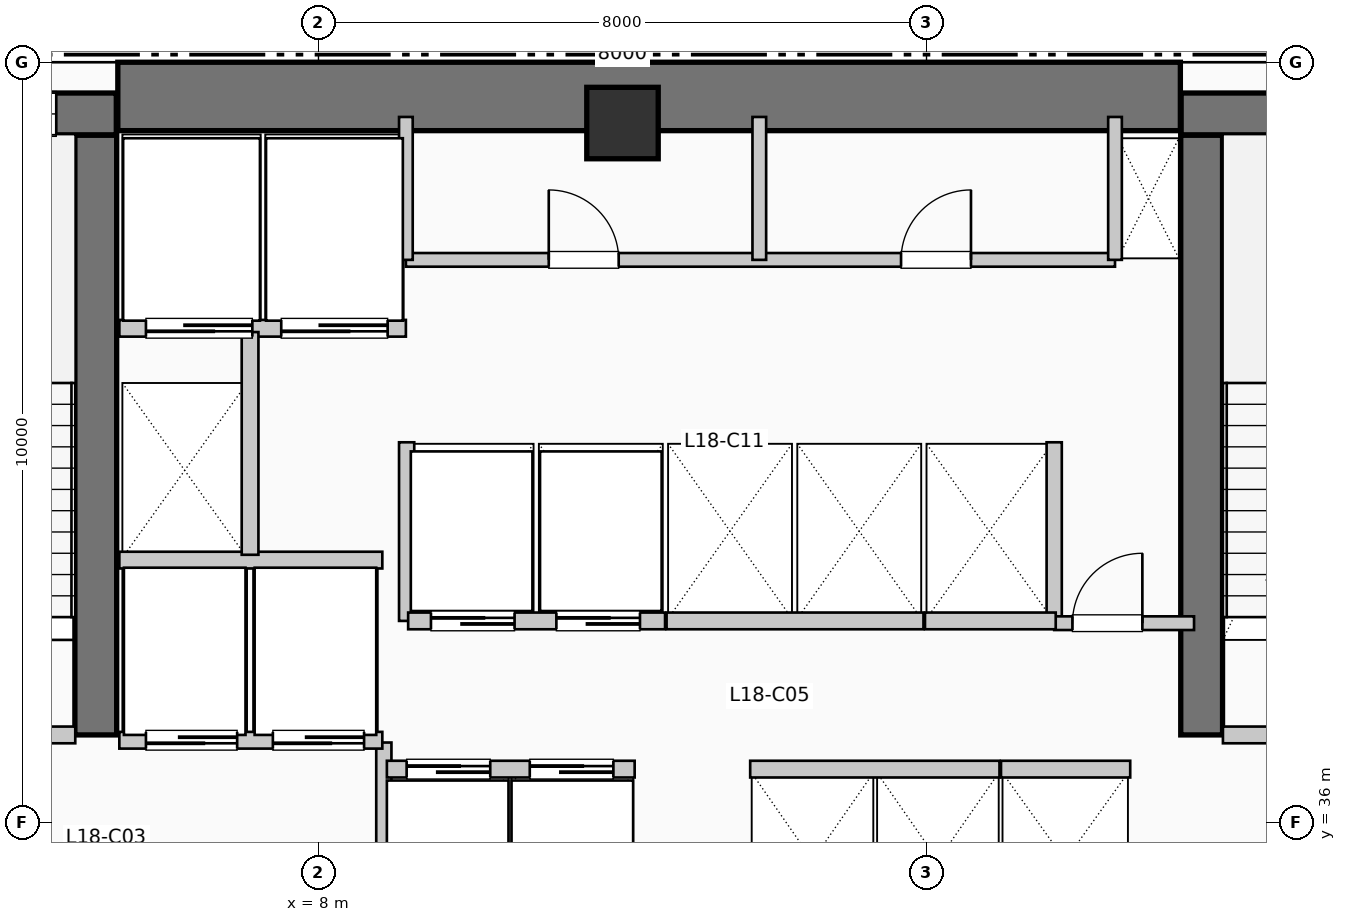
"""IFC4 building model, lengths in metres.
Left out: names, types, materials, properties, quantities, classifications, styles, units other than length and angle.
Written with IfcOpenShell. Run it as: python <this file> out.ifc"""

import sys

from ifc_helpers import new_model, si_unit, direction, frame, frame_2d, origin, origin_2d, place, context, subcontext, project, spatial, rectangle, extrude, element, fill, save


model = new_model("IFC4")
c1 = context("Model", 3, precision=1e-05, world=origin(), true_north=direction((0.0, 1.0)))
c2 = subcontext(c1, "Body", "Model", "MODEL_VIEW")
j1 = project(units=[si_unit("LENGTHUNIT", "METRE"), si_unit("PLANEANGLEUNIT", "RADIAN")], contexts=[c1])
p1 = place(None, origin())
s1 = spatial("IfcSite", under=j1, at=p1, CompositionType="ELEMENT")
p2 = place(p1, origin())
s2 = spatial("IfcBuilding", under=s1, at=p2, CompositionType="ELEMENT")
p3 = place(p2, frame((0.0, 0.0, 77.88)))
s3 = spatial("IfcBuildingStorey", under=s2, at=p3, CompositionType="ELEMENT", Elevation=77.88)
p4 = place(p3, frame((5.36, 45.55, 0.0), z_axis=(0.0, 0.0, 1.0), x_axis=(1.0, 0.0, 0.0)))
e1 = element("IfcWall", 1, at=p4, inside=s3, PredefinedType="SHEAR", context=c2, shape_type="SweptSolid", body=[
    extrude(rectangle(XDim=13.98, YDim=0.9, at=frame_2d((6.99, 0.0))), origin(), (0.0, 0.0, 1.0), 3.96),
])
p5 = place(p3, frame((5.07, 37.15, 0.0), z_axis=(0.0, 0.0, 1.0), x_axis=(0.0, 1.0, 0.0)))
e2 = element("IfcWall", 2, at=p5, inside=s3, PredefinedType="SHEAR", context=c2, shape_type="SweptSolid", body=[
    extrude(rectangle(XDim=7.89, YDim=0.55, at=frame_2d((3.945, 0.0))), origin(), (0.0, 0.0, 1.0), 3.96),
])
p6 = place(p3, frame((1.1, 45.32, 0.0), z_axis=(0.0, 0.0, 1.0), x_axis=(1.0, 0.0, 0.0)))
e3 = element("IfcWall", 3, at=p6, inside=s3, PredefinedType="SHEAR", context=c2, shape_type="SweptSolid", body=[
    extrude(rectangle(XDim=4.24, YDim=0.55, at=frame_2d((2.12, 0.0))), origin(), (0.0, 0.0, 1.0), 3.96),
])
p7 = place(p6, frame((2.05, 0.0, 1.05)))
e4 = element("IfcOpeningElement", 4, at=p7, cuts=e3, PredefinedType="OPENING", context=c2, shape_type="SweptSolid", body=[
    extrude(rectangle(XDim=1.4, YDim=1.8, at=frame_2d((0.7, 0.9))), frame((0.0, 0.285, 0.0), z_axis=(0.0, -1.0, 0.0), x_axis=(1.0, 0.0, 0.0)), (0.0, 0.0, 1.0), 0.57),
])
p8 = place(p3, frame((19.62, 37.15, 0.0), z_axis=(0.0, 0.0, 1.0), x_axis=(0.0, 1.0, 0.0)))
e5 = element("IfcWall", 5, at=p8, inside=s3, PredefinedType="SHEAR", context=c2, shape_type="SweptSolid", body=[
    extrude(rectangle(XDim=7.89, YDim=0.55, at=frame_2d((3.945, 0.0))), origin(), (0.0, 0.0, 1.0), 3.96),
])
p9 = place(p3, frame((19.35, 45.32, 0.0), z_axis=(0.0, 0.0, 1.0), x_axis=(1.0, 0.0, 0.0)))
e6 = element("IfcWall", 6, at=p9, inside=s3, PredefinedType="SHEAR", context=c2, shape_type="SweptSolid", body=[
    extrude(rectangle(XDim=3.69, YDim=0.55, at=frame_2d((1.845, 0.0))), origin(), (0.0, 0.0, 1.0), 3.96),
])
p10 = place(p9, frame((1.15, 0.0, 1.05)))
e7 = element("IfcOpeningElement", 7, at=p10, cuts=e6, PredefinedType="OPENING", context=c2, shape_type="SweptSolid", body=[
    extrude(rectangle(XDim=1.4, YDim=1.8, at=frame_2d((0.7, 0.9))), frame((0.0, 0.285, 0.0), z_axis=(0.0, -1.0, 0.0), x_axis=(1.0, 0.0, 0.0)), (0.0, 0.0, 1.0), 0.57),
])
p11 = place(p3, frame((12.0, 45.2, 0.0), z_axis=(0.0, 0.0, 1.0), x_axis=(1.0, 0.0, 0.0)))
e8 = element("IfcColumn", 8, at=p11, inside=s3, PredefinedType="COLUMN", context=c2, shape_type="SweptSolid", body=[
    extrude(rectangle(XDim=0.94, YDim=0.94, at=origin_2d()), origin(), (0.0, 0.0, 1.0), 3.96),
])
p12 = place(p3, frame((1.65, 37.15, 0.0), z_axis=(0.0, 0.0, 1.0), x_axis=(1.0, 0.0, 0.0)))
e9 = element("IfcWall", 9, at=p12, inside=s3, PredefinedType="PARTITIONING", context=c2, shape_type="SweptSolid", body=[
    extrude(rectangle(XDim=3.15, YDim=0.22, at=frame_2d((1.575, 0.0))), origin(), (0.0, 0.0, 1.0), 3.71),
])
p13 = place(p12, frame((2.05, 0.0, 0.0), z_axis=(0.0, 0.0, 1.0), x_axis=(-1.0, 0.0, 0.0)))
e10 = element("IfcOpeningElement", 10, at=p13, cuts=e9, PredefinedType="OPENING", context=c2, shape_type="SweptSolid", body=[
    extrude(rectangle(XDim=1.05, YDim=2.15, at=frame_2d((0.525, 1.075))), frame((0.0, 0.12, 0.0), z_axis=(0.0, -1.0, 0.0), x_axis=(1.0, 0.0, 0.0)), (0.0, 0.0, 1.0), 0.24),
])
p14 = place(p3, frame((8.86, 34.55, 0.0), z_axis=(0.0, 0.0, 1.0), x_axis=(0.0, 1.0, 0.0)))
e11 = element("IfcWall", 11, at=p14, inside=s3, PredefinedType="PARTITIONING", context=c2, shape_type="SweptSolid", body=[
    extrude(rectangle(XDim=2.5, YDim=0.2, at=frame_2d((1.25, 0.0))), origin(), (0.0, 0.0, 1.0), 3.71),
])
p15 = place(p3, frame((19.9, 37.15, 0.0), z_axis=(0.0, 0.0, 1.0), x_axis=(1.0, 0.0, 0.0)))
e12 = element("IfcWall", 12, at=p15, inside=s3, PredefinedType="PARTITIONING", context=c2, shape_type="SweptSolid", body=[
    extrude(rectangle(XDim=3.15, YDim=0.22, at=frame_2d((1.575, 0.0))), origin(), (0.0, 0.0, 1.0), 3.71),
])
p16 = place(p15, frame((2.05, 0.0, 0.0), z_axis=(0.0, 0.0, 1.0), x_axis=(-1.0, 0.0, 0.0)))
e13 = element("IfcOpeningElement", 13, at=p16, cuts=e12, PredefinedType="OPENING", context=c2, shape_type="SweptSolid", body=[
    extrude(rectangle(XDim=1.05, YDim=2.15, at=frame_2d((0.525, 1.075))), frame((0.0, 0.12, 0.0), z_axis=(0.0, -1.0, 0.0), x_axis=(1.0, 0.0, 0.0)), (0.0, 0.0, 1.0), 0.24),
])
p17 = place(p3, frame((5.38, 37.08, 0.0), z_axis=(0.0, 0.0, 1.0), x_axis=(1.0, 0.0, 0.0)))
e14 = element("IfcWall", 14, at=p17, inside=s3, PredefinedType="PARTITIONING", context=c2, shape_type="SweptSolid", body=[
    extrude(rectangle(XDim=3.46, YDim=0.22, at=frame_2d((1.73, 0.0))), origin(), (0.0, 0.0, 1.0), 3.71),
])
p18 = place(p17, frame((1.55, 0.0, 0.0), z_axis=(0.0, 0.0, 1.0), x_axis=(-1.0, 0.0, 0.0)))
e15 = element("IfcOpeningElement", 15, at=p18, cuts=e14, PredefinedType="OPENING", context=c2, shape_type="SweptSolid", body=[
    extrude(rectangle(XDim=1.2, YDim=2.2, at=frame_2d((0.6, 1.1))), frame((0.0, 0.12, 0.0), z_axis=(0.0, -1.0, 0.0), x_axis=(1.0, 0.0, 0.0)), (0.0, 0.0, 1.0), 0.24),
])
p19 = place(p17, frame((3.22, 0.0, 0.0), z_axis=(0.0, 0.0, 1.0), x_axis=(-1.0, 0.0, 0.0)))
e16 = element("IfcOpeningElement", 16, at=p19, cuts=e14, PredefinedType="OPENING", context=c2, shape_type="SweptSolid", body=[
    extrude(rectangle(XDim=1.2, YDim=2.2, at=frame_2d((0.6, 1.1))), frame((0.0, 0.12, 0.0), z_axis=(0.0, -1.0, 0.0), x_axis=(1.0, 0.0, 0.0)), (0.0, 0.0, 1.0), 0.24),
])
p20 = place(p3, frame((5.38, 39.45, 0.0), z_axis=(0.0, 0.0, 1.0), x_axis=(1.0, 0.0, 0.0)))
e17 = element("IfcWall", 17, at=p20, inside=s3, PredefinedType="PARTITIONING", context=c2, shape_type="SweptSolid", body=[
    extrude(rectangle(XDim=3.46, YDim=0.22, at=frame_2d((1.73, 0.0))), origin(), (0.0, 0.0, 1.0), 3.71),
])
p21 = place(p3, frame((5.38, 42.5, 0.0), z_axis=(0.0, 0.0, 1.0), x_axis=(1.0, 0.0, 0.0)))
e18 = element("IfcWall", 18, at=p21, inside=s3, PredefinedType="PARTITIONING", context=c2, shape_type="SweptSolid", body=[
    extrude(rectangle(XDim=3.77, YDim=0.22, at=frame_2d((1.885, 0.0))), origin(), (0.0, 0.0, 1.0), 3.71),
])
p22 = place(p21, frame((1.75, 0.0, 0.0), z_axis=(0.0, 0.0, 1.0), x_axis=(-1.0, 0.0, 0.0)))
e19 = element("IfcOpeningElement", 19, at=p22, cuts=e18, PredefinedType="OPENING", context=c2, shape_type="SweptSolid", body=[
    extrude(rectangle(XDim=1.4, YDim=2.2, at=frame_2d((0.7, 1.1))), frame((0.0, 0.12, 0.0), z_axis=(0.0, -1.0, 0.0), x_axis=(1.0, 0.0, 0.0)), (0.0, 0.0, 1.0), 0.24),
])
p23 = place(p21, frame((3.53, 0.0, 0.0), z_axis=(0.0, 0.0, 1.0), x_axis=(-1.0, 0.0, 0.0)))
e20 = element("IfcOpeningElement", 20, at=p23, cuts=e18, PredefinedType="OPENING", context=c2, shape_type="SweptSolid", body=[
    extrude(rectangle(XDim=1.4, YDim=2.2, at=frame_2d((0.7, 1.1))), frame((0.0, 0.12, 0.0), z_axis=(0.0, -1.0, 0.0), x_axis=(1.0, 0.0, 0.0)), (0.0, 0.0, 1.0), 0.24),
])
p24 = place(p3, frame((7.1, 39.52, 0.0), z_axis=(0.0, 0.0, 1.0), x_axis=(0.0, 1.0, 0.0)))
e21 = element("IfcWall", 21, at=p24, inside=s3, PredefinedType="PARTITIONING", context=c2, shape_type="SweptSolid", body=[
    extrude(rectangle(XDim=2.93, YDim=0.22, at=frame_2d((1.465, 0.0))), origin(), (0.0, 0.0, 1.0), 3.71),
])
for number, where, z_axis, x_axis in (
    (22, (9.16, 38.65, 0.0), (0.0, 0.0, 1.0), (0.0, 1.0, 0.0)),
    (23, (17.68, 38.65, 0.0), (0.0, 0.0, 1.0), (0.0, 1.0, 0.0)),
):
    element("IfcWall", number, at=place(p3, frame(where, z_axis=z_axis, x_axis=x_axis)), inside=s3, PredefinedType="PARTITIONING", context=c2, shape_type="SweptSolid", body=[
        extrude(rectangle(XDim=2.35, YDim=0.2, at=frame_2d((1.175, 0.0))), origin(), (0.0, 0.0, 1.0), 3.71),
    ])
p25 = place(p3, frame((17.68, 38.62, 0.0), z_axis=(0.0, 0.0, 1.0), x_axis=(1.0, 0.0, 0.0)))
e24 = element("IfcWall", 24, at=p25, inside=s3, PredefinedType="PARTITIONING", context=c2, shape_type="SweptSolid", body=[
    extrude(rectangle(XDim=1.84, YDim=0.18, at=frame_2d((0.92, 0.0))), origin(), (0.0, 0.0, 1.0), 3.71),
])
p26 = place(p25, frame((0.24, 0.0, 0.0)))
e25 = element("IfcOpeningElement", 25, at=p26, cuts=e24, PredefinedType="OPENING", context=c2, shape_type="SweptSolid", body=[
    extrude(rectangle(XDim=0.92, YDim=2.1, at=frame_2d((0.46, 1.05))), frame((0.0, 0.1, 0.0), z_axis=(0.0, -1.0, 0.0), x_axis=(1.0, 0.0, 0.0)), (0.0, 0.0, 1.0), 0.2),
])
p27 = place(p3, frame((8.9, 36.7, 0.0), z_axis=(0.0, 0.0, 1.0), x_axis=(1.0, 0.0, 0.0)))
e26 = element("IfcWall", 26, at=p27, inside=s3, PredefinedType="PARTITIONING", context=c2, shape_type="SweptSolid", body=[
    extrude(rectangle(XDim=3.26, YDim=0.22, at=frame_2d((1.63, 0.0))), origin(), (0.0, 0.0, 1.0), 3.71),
])
p28 = place(p27, frame((0.26, 0.0, 0.0)))
e27 = element("IfcOpeningElement", 27, at=p28, cuts=e26, PredefinedType="OPENING", context=c2, shape_type="SweptSolid", body=[
    extrude(rectangle(XDim=1.1, YDim=2.2, at=frame_2d((0.55, 1.1))), frame((0.0, 0.12, 0.0), z_axis=(0.0, -1.0, 0.0), x_axis=(1.0, 0.0, 0.0)), (0.0, 0.0, 1.0), 0.24),
])
p29 = place(p27, frame((1.88, 0.0, 0.0)))
e28 = element("IfcOpeningElement", 28, at=p29, cuts=e26, PredefinedType="OPENING", context=c2, shape_type="SweptSolid", body=[
    extrude(rectangle(XDim=1.1, YDim=2.2, at=frame_2d((0.55, 1.1))), frame((0.0, 0.12, 0.0), z_axis=(0.0, -1.0, 0.0), x_axis=(1.0, 0.0, 0.0)), (0.0, 0.0, 1.0), 0.24),
])
p30 = place(p3, frame((9.18, 38.65, 0.0), z_axis=(0.0, 0.0, 1.0), x_axis=(1.0, 0.0, 0.0)))
e29 = element("IfcWall", 29, at=p30, inside=s3, PredefinedType="PARTITIONING", context=c2, shape_type="SweptSolid", body=[
    extrude(rectangle(XDim=3.38, YDim=0.22, at=frame_2d((1.69, 0.0))), origin(), (0.0, 0.0, 1.0), 3.71),
])
p31 = place(p30, frame((0.3, 0.0, 0.0)))
e30 = element("IfcOpeningElement", 30, at=p31, cuts=e29, PredefinedType="OPENING", context=c2, shape_type="SweptSolid", body=[
    extrude(rectangle(XDim=1.1, YDim=2.2, at=frame_2d((0.55, 1.1))), frame((0.0, 0.12, 0.0), z_axis=(0.0, -1.0, 0.0), x_axis=(1.0, 0.0, 0.0)), (0.0, 0.0, 1.0), 0.24),
])
p32 = place(p30, frame((1.95, 0.0, 0.0)))
e31 = element("IfcOpeningElement", 31, at=p32, cuts=e29, PredefinedType="OPENING", context=c2, shape_type="SweptSolid", body=[
    extrude(rectangle(XDim=1.1, YDim=2.2, at=frame_2d((0.55, 1.1))), frame((0.0, 0.12, 0.0), z_axis=(0.0, -1.0, 0.0), x_axis=(1.0, 0.0, 0.0)), (0.0, 0.0, 1.0), 0.24),
])
p33 = place(p3, frame((13.68, 36.7, 0.0), z_axis=(0.0, 0.0, 1.0), x_axis=(1.0, 0.0, 0.0)))
e32 = element("IfcWall", 32, at=p33, inside=s3, PredefinedType="PARTITIONING", context=c2, shape_type="SweptSolid", body=[
    extrude(rectangle(XDim=3.28, YDim=0.22, at=frame_2d((1.64, 0.0))), origin(), (0.0, 0.0, 1.0), 3.71),
])
p34 = place(p3, frame((12.58, 38.65, 0.0), z_axis=(0.0, 0.0, 1.0), x_axis=(1.0, 0.0, 0.0)))
e33 = element("IfcWall", 33, at=p34, inside=s3, PredefinedType="PARTITIONING", context=c2, shape_type="SweptSolid", body=[
    extrude(rectangle(XDim=3.38, YDim=0.22, at=frame_2d((1.69, 0.0))), origin(), (0.0, 0.0, 1.0), 3.71),
])
p35 = place(p3, frame((16.98, 36.7, 0.0), z_axis=(0.0, 0.0, 1.0), x_axis=(1.0, 0.0, 0.0)))
e34 = element("IfcWall", 34, at=p35, inside=s3, PredefinedType="PARTITIONING", context=c2, shape_type="SweptSolid", body=[
    extrude(rectangle(XDim=1.7, YDim=0.22, at=frame_2d((0.85, 0.0))), origin(), (0.0, 0.0, 1.0), 3.71),
])
p36 = place(p3, frame((15.98, 38.65, 0.0), z_axis=(0.0, 0.0, 1.0), x_axis=(1.0, 0.0, 0.0)))
e35 = element("IfcWall", 35, at=p36, inside=s3, PredefinedType="PARTITIONING", context=c2, shape_type="SweptSolid", body=[
    extrude(rectangle(XDim=1.72, YDim=0.22, at=frame_2d((0.86, 0.0))), origin(), (0.0, 0.0, 1.0), 3.71),
])
p37 = place(p3, frame((9.15, 43.4, 0.0), z_axis=(0.0, 0.0, 1.0), x_axis=(1.0, 0.0, 0.0)))
e36 = element("IfcWall", 36, at=p37, inside=s3, PredefinedType="PLUMBINGWALL", context=c2, shape_type="SweptSolid", body=[
    extrude(rectangle(XDim=9.33, YDim=0.18, at=frame_2d((4.665, 0.0))), origin(), (0.0, 0.0, 1.0), 3.71),
])
p38 = place(p37, frame((1.88, 0.0, 0.0)))
e37 = element("IfcOpeningElement", 37, at=p38, cuts=e36, PredefinedType="OPENING", context=c2, shape_type="SweptSolid", body=[
    extrude(rectangle(XDim=0.92, YDim=2.1, at=frame_2d((0.46, 1.05))), frame((0.0, 0.1, 0.0), z_axis=(0.0, -1.0, 0.0), x_axis=(1.0, 0.0, 0.0)), (0.0, 0.0, 1.0), 0.2),
])
p39 = place(p37, frame((6.515, 0.0, 0.0)))
e38 = element("IfcOpeningElement", 38, at=p39, cuts=e36, PredefinedType="OPENING", context=c2, shape_type="SweptSolid", body=[
    extrude(rectangle(XDim=0.92, YDim=2.1, at=frame_2d((0.46, 1.05))), frame((0.0, 0.1, 0.0), z_axis=(0.0, -1.0, 0.0), x_axis=(1.0, 0.0, 0.0)), (0.0, 0.0, 1.0), 0.2),
])
for number, where, z_axis, x_axis in (
    (39, (9.15, 43.4, 0.0), (0.0, 0.0, 1.0), (0.0, 1.0, 0.0)),
    (40, (18.48, 43.4, 0.0), (0.0, 0.0, 1.0), (0.0, 1.0, 0.0)),
    (41, (13.8, 43.4, 0.0), (0.0, 0.0, 1.0), (0.0, 1.0, 0.0)),
):
    element("IfcWall", number, at=place(p3, frame(where, z_axis=z_axis, x_axis=x_axis)), inside=s3, PredefinedType="PLUMBINGWALL", context=c2, shape_type="SweptSolid", body=[
        extrude(rectangle(XDim=1.88, YDim=0.18, at=frame_2d((0.94, 0.0))), origin(), (0.0, 0.0, 1.0), 3.71),
    ])
p40 = place(p7, origin())
e42 = element("IfcWindow", 42, at=p40, inside=s3, PartitioningType="SINGLE_PANEL", PredefinedType="WINDOW", context=c2, shape_type="SweptSolid", body=[
    extrude(rectangle(XDim=1.4, YDim=1.8, at=frame_2d((0.7, 0.9))), frame((0.0, 0.03, 0.0), z_axis=(0.0, -1.0, 0.0), x_axis=(1.0, 0.0, 0.0)), (0.0, 0.0, 1.0), 0.06),
])
fill(e4, e42)
p41 = place(p18, origin())
e43 = element("IfcDoor", 43, at=p41, inside=s3, OperationType="SLIDING_TO_RIGHT", PredefinedType="DOOR", context=c2, shape_type="SweptSolid", body=[
    extrude(rectangle(XDim=1.2, YDim=2.2, at=frame_2d((0.6, 1.1))), frame((0.0, 0.025, 0.0), z_axis=(0.0, -1.0, 0.0), x_axis=(1.0, 0.0, 0.0)), (0.0, 0.0, 1.0), 0.05),
])
fill(e15, e43)
p42 = place(p19, origin())
e44 = element("IfcDoor", 44, at=p42, inside=s3, OperationType="SLIDING_TO_RIGHT", PredefinedType="DOOR", context=c2, shape_type="SweptSolid", body=[
    extrude(rectangle(XDim=1.2, YDim=2.2, at=frame_2d((0.6, 1.1))), frame((0.0, 0.025, 0.0), z_axis=(0.0, -1.0, 0.0), x_axis=(1.0, 0.0, 0.0)), (0.0, 0.0, 1.0), 0.05),
])
fill(e16, e44)
p43 = place(p22, origin())
e45 = element("IfcDoor", 45, at=p43, inside=s3, OperationType="SLIDING_TO_LEFT", PredefinedType="DOOR", context=c2, shape_type="SweptSolid", body=[
    extrude(rectangle(XDim=1.4, YDim=2.2, at=frame_2d((0.7, 1.1))), frame((0.0, 0.025, 0.0), z_axis=(0.0, -1.0, 0.0), x_axis=(1.0, 0.0, 0.0)), (0.0, 0.0, 1.0), 0.05),
])
fill(e19, e45)
p44 = place(p23, origin())
e46 = element("IfcDoor", 46, at=p44, inside=s3, OperationType="SLIDING_TO_LEFT", PredefinedType="DOOR", context=c2, shape_type="SweptSolid", body=[
    extrude(rectangle(XDim=1.4, YDim=2.2, at=frame_2d((0.7, 1.1))), frame((0.0, 0.025, 0.0), z_axis=(0.0, -1.0, 0.0), x_axis=(1.0, 0.0, 0.0)), (0.0, 0.0, 1.0), 0.05),
])
fill(e20, e46)
p45 = place(p26, origin())
e47 = element("IfcDoor", 47, at=p45, inside=s3, OperationType="SINGLE_SWING_RIGHT", PredefinedType="DOOR", context=c2, shape_type="SweptSolid", body=[
    extrude(rectangle(XDim=0.92, YDim=2.1, at=frame_2d((0.46, 1.05))), frame((0.0, 0.025, 0.0), z_axis=(0.0, -1.0, 0.0), x_axis=(1.0, 0.0, 0.0)), (0.0, 0.0, 1.0), 0.05),
])
fill(e25, e47)
p46 = place(p28, origin())
e48 = element("IfcDoor", 48, at=p46, inside=s3, OperationType="SLIDING_TO_LEFT", PredefinedType="DOOR", context=c2, shape_type="SweptSolid", body=[
    extrude(rectangle(XDim=1.1, YDim=2.2, at=frame_2d((0.55, 1.1))), frame((0.0, 0.025, 0.0), z_axis=(0.0, -1.0, 0.0), x_axis=(1.0, 0.0, 0.0)), (0.0, 0.0, 1.0), 0.05),
])
fill(e27, e48)
p47 = place(p29, origin())
e49 = element("IfcDoor", 49, at=p47, inside=s3, OperationType="SLIDING_TO_LEFT", PredefinedType="DOOR", context=c2, shape_type="SweptSolid", body=[
    extrude(rectangle(XDim=1.1, YDim=2.2, at=frame_2d((0.55, 1.1))), frame((0.0, 0.025, 0.0), z_axis=(0.0, -1.0, 0.0), x_axis=(1.0, 0.0, 0.0)), (0.0, 0.0, 1.0), 0.05),
])
fill(e28, e49)
p48 = place(p31, origin())
e50 = element("IfcDoor", 50, at=p48, inside=s3, OperationType="SLIDING_TO_LEFT", PredefinedType="DOOR", context=c2, shape_type="SweptSolid", body=[
    extrude(rectangle(XDim=1.1, YDim=2.2, at=frame_2d((0.55, 1.1))), frame((0.0, 0.025, 0.0), z_axis=(0.0, -1.0, 0.0), x_axis=(1.0, 0.0, 0.0)), (0.0, 0.0, 1.0), 0.05),
])
fill(e30, e50)
p49 = place(p32, origin())
e51 = element("IfcDoor", 51, at=p49, inside=s3, OperationType="SLIDING_TO_LEFT", PredefinedType="DOOR", context=c2, shape_type="SweptSolid", body=[
    extrude(rectangle(XDim=1.1, YDim=2.2, at=frame_2d((0.55, 1.1))), frame((0.0, 0.025, 0.0), z_axis=(0.0, -1.0, 0.0), x_axis=(1.0, 0.0, 0.0)), (0.0, 0.0, 1.0), 0.05),
])
fill(e31, e51)
p50 = place(p38, origin())
e52 = element("IfcDoor", 52, at=p50, inside=s3, OperationType="SINGLE_SWING_LEFT", PredefinedType="DOOR", context=c2, shape_type="SweptSolid", body=[
    extrude(rectangle(XDim=0.92, YDim=2.1, at=frame_2d((0.46, 1.05))), frame((0.0, 0.025, 0.0), z_axis=(0.0, -1.0, 0.0), x_axis=(1.0, 0.0, 0.0)), (0.0, 0.0, 1.0), 0.05),
])
fill(e37, e52)
p51 = place(p39, origin())
e53 = element("IfcDoor", 53, at=p51, inside=s3, OperationType="SINGLE_SWING_RIGHT", PredefinedType="DOOR", context=c2, shape_type="SweptSolid", body=[
    extrude(rectangle(XDim=0.92, YDim=2.1, at=frame_2d((0.46, 1.05))), frame((0.0, 0.025, 0.0), z_axis=(0.0, -1.0, 0.0), x_axis=(1.0, 0.0, 0.0)), (0.0, 0.0, 1.0), 0.05),
])
fill(e38, e53)
save(model, sys.argv[1])
